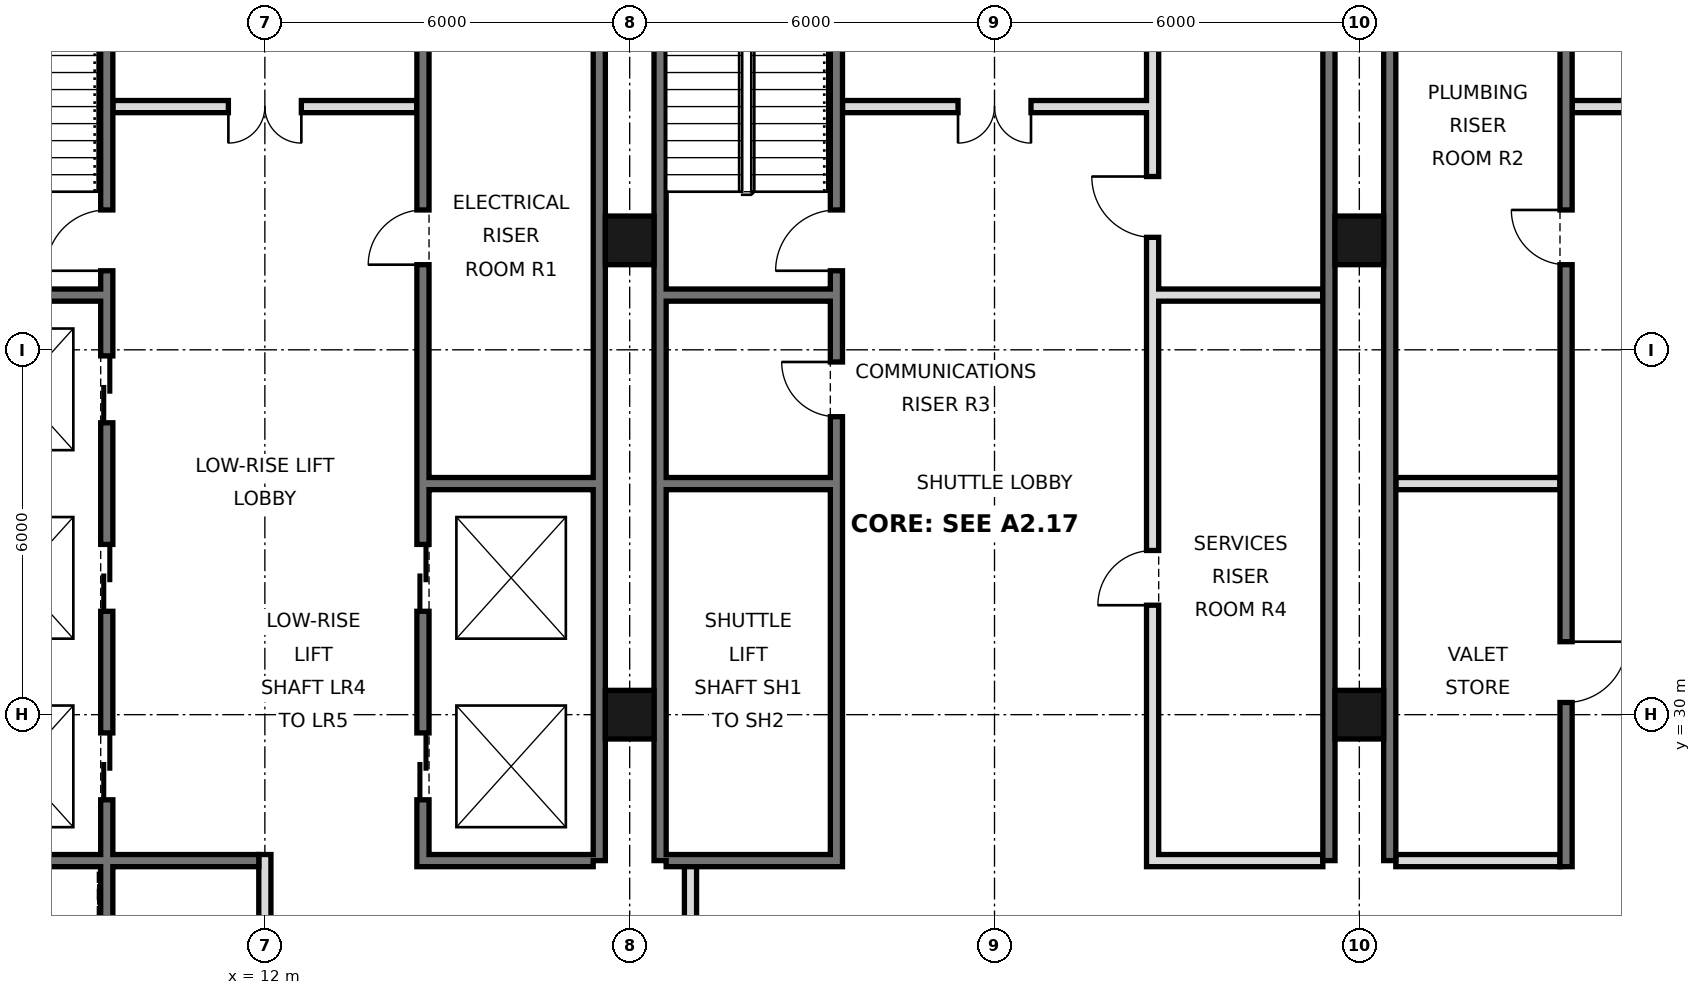
"""IFC4 building model, lengths in metres.
Left out: names, types, materials, properties, quantities, classifications, styles, units other than length and angle.
Written with IfcOpenShell. Run it as: python <this file> out.ifc"""

import sys

from ifc_helpers import new_model, si_unit, direction, frame, frame_2d, origin, origin_2d, place, context, subcontext, project, spatial, rectangle, hollow_rectangle, extrude, element, fill, save


model = new_model("IFC4")
c1 = context("Model", 3, precision=1e-05, world=origin(), true_north=direction((0.0, 1.0)))
c2 = subcontext(c1, "Body", "Model", "MODEL_VIEW")
j1 = project(units=[si_unit("LENGTHUNIT", "METRE"), si_unit("PLANEANGLEUNIT", "RADIAN")], contexts=[c1])
p1 = place(None, origin())
s1 = spatial("IfcSite", under=j1, at=p1, CompositionType="ELEMENT")
p2 = place(p1, origin())
s2 = spatial("IfcBuilding", under=s1, at=p2, CompositionType="ELEMENT")
p3 = place(p2, frame((0.0, 0.0, 67.8)))
s3 = spatial("IfcBuildingStorey", under=s2, at=p3, CompositionType="ELEMENT", Elevation=67.8)
for number, where, z_axis, x_axis in (
    (1, (18.0, 30.0, 0.0), (0.0, 0.0, 1.0), (1.0, 0.0, 0.0)),
    (2, (18.0, 37.8, 0.0), (0.0, 0.0, 1.0), (1.0, 0.0, 0.0)),
    (3, (30.0, 30.0, 0.0), (0.0, 0.0, 1.0), (1.0, 0.0, 0.0)),
    (4, (30.0, 37.8, 0.0), (0.0, 0.0, 1.0), (1.0, 0.0, 0.0)),
):
    element("IfcColumn", number, at=place(p3, frame(where, z_axis=z_axis, x_axis=x_axis)), inside=s3, PredefinedType="COLUMN", context=c2, shape_type="SweptSolid", body=[
        extrude(hollow_rectangle(XDim=0.8, YDim=0.8, WallThickness=0.06, at=origin_2d()), origin(), (0.0, 0.0, 1.0), 3.6),
    ])
for number, where, z_axis, x_axis in (
    (5, (17.5, 27.6, 0.0), (0.0, 0.0, 1.0), (0.0, 1.0, 0.0)),
    (6, (18.5, 27.6, 0.0), (0.0, 0.0, 1.0), (0.0, 1.0, 0.0)),
    (7, (29.5, 27.6, 0.0), (0.0, 0.0, 1.0), (0.0, 1.0, 0.0)),
    (8, (30.5, 27.6, 0.0), (0.0, 0.0, 1.0), (0.0, 1.0, 0.0)),
):
    element("IfcWall", number, at=place(p3, frame(where, z_axis=z_axis, x_axis=x_axis)), inside=s3, PredefinedType="SOLIDWALL", context=c2, shape_type="SweptSolid", body=[
        extrude(rectangle(XDim=17.5, YDim=0.2, at=frame_2d((8.75, 0.0))), origin(), (0.0, 0.0, 1.0), 3.42),
    ])
p4 = place(p3, frame((19.0, 21.6, 0.0), z_axis=(0.0, 0.0, 1.0), x_axis=(0.0, 1.0, 0.0)))
e9 = element("IfcWall", 9, at=p4, inside=s3, PredefinedType="PARTITIONING", context=c2, shape_type="SweptSolid", body=[
    extrude(rectangle(XDim=6.0, YDim=0.2, at=frame_2d((3.0, 0.0))), origin(), (0.0, 0.0, 1.0), 3.42),
])
p5 = place(p4, frame((2.1, 0.0, 0.0)))
e10 = element("IfcOpeningElement", 10, at=p5, cuts=e9, PredefinedType="OPENING", context=c2, shape_type="SweptSolid", body=[
    extrude(rectangle(XDim=1.8, YDim=2.1, at=frame_2d((0.9, 1.05))), frame((0.0, 0.11, 0.0), z_axis=(0.0, -1.0, 0.0), x_axis=(1.0, 0.0, 0.0)), (0.0, 0.0, 1.0), 0.22),
])
p6 = place(p3, frame((12.0, 21.6, 0.0), z_axis=(0.0, 0.0, 1.0), x_axis=(0.0, 1.0, 0.0)))
e11 = element("IfcWall", 11, at=p6, inside=s3, PredefinedType="PARTITIONING", context=c2, shape_type="SweptSolid", body=[
    extrude(rectangle(XDim=6.1, YDim=0.2, at=frame_2d((3.05, 0.0))), origin(), (0.0, 0.0, 1.0), 3.42),
])
p7 = place(p3, frame((14.6, 27.5, 0.0), z_axis=(0.0, 0.0, 1.0), x_axis=(0.0, 1.0, 0.0)))
e12 = element("IfcWall", 12, at=p7, inside=s3, PredefinedType="SOLIDWALL", context=c2, shape_type="SweptSolid", body=[
    extrude(rectangle(XDim=17.5, YDim=0.2, at=frame_2d((8.75, 0.0))), origin(), (0.0, 0.0, 1.0), 3.42),
])
p8 = place(p7, frame((1.1, 0.0, 0.0)))
e13 = element("IfcOpeningElement", 13, at=p8, cuts=e12, PredefinedType="OPENING", context=c2, shape_type="SweptSolid", body=[
    extrude(rectangle(XDim=1.1, YDim=2.1, at=frame_2d((0.55, 1.05))), frame((0.0, 0.11, 0.0), z_axis=(0.0, -1.0, 0.0), x_axis=(1.0, 0.0, 0.0)), (0.0, 0.0, 1.0), 0.22),
])
p9 = place(p7, frame((4.2, 0.0, 0.0)))
e14 = element("IfcOpeningElement", 14, at=p9, cuts=e12, PredefinedType="OPENING", context=c2, shape_type="SweptSolid", body=[
    extrude(rectangle(XDim=1.1, YDim=2.1, at=frame_2d((0.55, 1.05))), frame((0.0, 0.11, 0.0), z_axis=(0.0, -1.0, 0.0), x_axis=(1.0, 0.0, 0.0)), (0.0, 0.0, 1.0), 0.22),
])
p10 = place(p7, frame((15.4, 0.0, 0.0)))
e15 = element("IfcOpeningElement", 15, at=p10, cuts=e12, PredefinedType="OPENING", context=c2, shape_type="SweptSolid", body=[
    extrude(rectangle(XDim=1.1, YDim=2.1, at=frame_2d((0.55, 1.05))), frame((0.0, 0.11, 0.0), z_axis=(0.0, -1.0, 0.0), x_axis=(1.0, 0.0, 0.0)), (0.0, 0.0, 1.0), 0.22),
])
p11 = place(p7, frame((9.9, 0.0, 0.0)))
e16 = element("IfcOpeningElement", 16, at=p11, cuts=e12, PredefinedType="OPENING", context=c2, shape_type="SweptSolid", body=[
    extrude(rectangle(XDim=0.9, YDim=2.1, at=frame_2d((0.45, 1.05))), frame((0.0, 0.11, 0.0), z_axis=(0.0, -1.0, 0.0), x_axis=(1.0, 0.0, 0.0)), (0.0, 0.0, 1.0), 0.22),
])
p12 = place(p3, frame((21.4, 27.5, 0.0), z_axis=(0.0, 0.0, 1.0), x_axis=(0.0, 1.0, 0.0)))
e17 = element("IfcWall", 17, at=p12, inside=s3, PredefinedType="SOLIDWALL", context=c2, shape_type="SweptSolid", body=[
    extrude(rectangle(XDim=17.5, YDim=0.2, at=frame_2d((8.75, 0.0))), origin(), (0.0, 0.0, 1.0), 3.42),
])
p13 = place(p12, frame((9.8, 0.0, 0.0)))
e18 = element("IfcOpeningElement", 18, at=p13, cuts=e17, PredefinedType="OPENING", context=c2, shape_type="SweptSolid", body=[
    extrude(rectangle(XDim=1.0, YDim=2.1, at=frame_2d((0.5, 1.05))), frame((0.0, 0.11, 0.0), z_axis=(0.0, -1.0, 0.0), x_axis=(1.0, 0.0, 0.0)), (0.0, 0.0, 1.0), 0.22),
])
p14 = place(p12, frame((7.4, 0.0, 0.0)))
e19 = element("IfcOpeningElement", 19, at=p14, cuts=e17, PredefinedType="OPENING", context=c2, shape_type="SweptSolid", body=[
    extrude(rectangle(XDim=0.9, YDim=2.1, at=frame_2d((0.45, 1.05))), frame((0.0, 0.11, 0.0), z_axis=(0.0, -1.0, 0.0), x_axis=(1.0, 0.0, 0.0)), (0.0, 0.0, 1.0), 0.22),
])
p15 = place(p3, frame((26.6, 27.5, 0.0), z_axis=(0.0, 0.0, 1.0), x_axis=(0.0, 1.0, 0.0)))
e20 = element("IfcWall", 20, at=p15, inside=s3, PredefinedType="SOLIDWALL", context=c2, shape_type="SweptSolid", body=[
    extrude(rectangle(XDim=17.5, YDim=0.2, at=frame_2d((8.75, 0.0))), origin(), (0.0, 0.0, 1.0), 3.42),
])
p16 = place(p15, frame((4.3, 0.0, 0.0)))
e21 = element("IfcOpeningElement", 21, at=p16, cuts=e20, PredefinedType="OPENING", context=c2, shape_type="SweptSolid", body=[
    extrude(rectangle(XDim=0.9, YDim=2.1, at=frame_2d((0.45, 1.05))), frame((0.0, 0.11, 0.0), z_axis=(0.0, -1.0, 0.0), x_axis=(1.0, 0.0, 0.0)), (0.0, 0.0, 1.0), 0.22),
])
p17 = place(p15, frame((10.35, 0.0, 0.0)))
e22 = element("IfcOpeningElement", 22, at=p17, cuts=e20, PredefinedType="OPENING", context=c2, shape_type="SweptSolid", body=[
    extrude(rectangle(XDim=1.0, YDim=2.1, at=frame_2d((0.5, 1.05))), frame((0.0, 0.11, 0.0), z_axis=(0.0, -1.0, 0.0), x_axis=(1.0, 0.0, 0.0)), (0.0, 0.0, 1.0), 0.22),
])
p18 = place(p3, frame((33.4, 27.5, 0.0), z_axis=(0.0, 0.0, 1.0), x_axis=(0.0, 1.0, 0.0)))
e23 = element("IfcWall", 23, at=p18, inside=s3, PredefinedType="SOLIDWALL", context=c2, shape_type="SweptSolid", body=[
    extrude(rectangle(XDim=17.5, YDim=0.2, at=frame_2d((8.75, 0.0))), origin(), (0.0, 0.0, 1.0), 3.42),
])
p19 = place(p18, frame((15.4, 0.0, 0.0)))
e24 = element("IfcOpeningElement", 24, at=p19, cuts=e23, PredefinedType="OPENING", context=c2, shape_type="SweptSolid", body=[
    extrude(rectangle(XDim=1.1, YDim=2.1, at=frame_2d((0.55, 1.05))), frame((0.0, 0.11, 0.0), z_axis=(0.0, -1.0, 0.0), x_axis=(1.0, 0.0, 0.0)), (0.0, 0.0, 1.0), 0.22),
])
p20 = place(p18, frame((2.7, 0.0, 0.0)))
e25 = element("IfcOpeningElement", 25, at=p20, cuts=e23, PredefinedType="OPENING", context=c2, shape_type="SweptSolid", body=[
    extrude(rectangle(XDim=1.0, YDim=2.1, at=frame_2d((0.5, 1.05))), frame((0.0, 0.11, 0.0), z_axis=(0.0, -1.0, 0.0), x_axis=(1.0, 0.0, 0.0)), (0.0, 0.0, 1.0), 0.22),
])
p21 = place(p18, frame((9.9, 0.0, 0.0)))
e26 = element("IfcOpeningElement", 26, at=p21, cuts=e23, PredefinedType="OPENING", context=c2, shape_type="SweptSolid", body=[
    extrude(rectangle(XDim=0.9, YDim=2.1, at=frame_2d((0.45, 1.05))), frame((0.0, 0.11, 0.0), z_axis=(0.0, -1.0, 0.0), x_axis=(1.0, 0.0, 0.0)), (0.0, 0.0, 1.0), 0.22),
])
p22 = place(p3, frame((9.4, 21.6, 0.0), z_axis=(0.0, 0.0, 1.0), x_axis=(0.0, 1.0, 0.0)))
e27 = element("IfcWall", 27, at=p22, inside=s3, PredefinedType="SOLIDWALL", context=c2, shape_type="SweptSolid", body=[
    extrude(rectangle(XDim=23.4, YDim=0.2, at=frame_2d((11.7, 0.0))), origin(), (0.0, 0.0, 1.0), 3.42),
])
p23 = place(p22, frame((7.0, 0.0, 0.0)))
e28 = element("IfcOpeningElement", 28, at=p23, cuts=e27, PredefinedType="OPENING", context=c2, shape_type="SweptSolid", body=[
    extrude(rectangle(XDim=1.1, YDim=2.1, at=frame_2d((0.55, 1.05))), frame((0.0, 0.11, 0.0), z_axis=(0.0, -1.0, 0.0), x_axis=(1.0, 0.0, 0.0)), (0.0, 0.0, 1.0), 0.22),
])
p24 = place(p22, frame((10.1, 0.0, 0.0)))
e29 = element("IfcOpeningElement", 29, at=p24, cuts=e27, PredefinedType="OPENING", context=c2, shape_type="SweptSolid", body=[
    extrude(rectangle(XDim=1.1, YDim=2.1, at=frame_2d((0.55, 1.05))), frame((0.0, 0.11, 0.0), z_axis=(0.0, -1.0, 0.0), x_axis=(1.0, 0.0, 0.0)), (0.0, 0.0, 1.0), 0.22),
])
p25 = place(p22, frame((13.2, 0.0, 0.0)))
e30 = element("IfcOpeningElement", 30, at=p25, cuts=e27, PredefinedType="OPENING", context=c2, shape_type="SweptSolid", body=[
    extrude(rectangle(XDim=1.1, YDim=2.1, at=frame_2d((0.55, 1.05))), frame((0.0, 0.11, 0.0), z_axis=(0.0, -1.0, 0.0), x_axis=(1.0, 0.0, 0.0)), (0.0, 0.0, 1.0), 0.22),
])
p26 = place(p22, frame((15.7, 0.0, 0.0)))
e31 = element("IfcOpeningElement", 31, at=p26, cuts=e27, PredefinedType="OPENING", context=c2, shape_type="SweptSolid", body=[
    extrude(rectangle(XDim=1.0, YDim=2.1, at=frame_2d((0.5, 1.05))), frame((0.0, 0.11, 0.0), z_axis=(0.0, -1.0, 0.0), x_axis=(1.0, 0.0, 0.0)), (0.0, 0.0, 1.0), 0.22),
])
p27 = place(p22, frame((0.175, 0.0, 0.0)))
e32 = element("IfcOpeningElement", 32, at=p27, cuts=e27, PredefinedType="OPENING", context=c2, shape_type="SweptSolid", body=[
    extrude(rectangle(XDim=0.9, YDim=2.1, at=frame_2d((0.45, 1.05))), frame((0.0, 0.11, 0.0), z_axis=(0.0, -1.0, 0.0), x_axis=(1.0, 0.0, 0.0)), (0.0, 0.0, 1.0), 0.22),
])
for number, where, z_axis, x_axis in (
    (33, (14.7, 27.6, 0.0), (0.0, 0.0, 1.0), (1.0, 0.0, 0.0)),
    (34, (18.6, 27.6, 0.0), (0.0, 0.0, 1.0), (1.0, 0.0, 0.0)),
    (35, (26.7, 27.6, 0.0), (0.0, 0.0, 1.0), (1.0, 0.0, 0.0)),
):
    element("IfcWall", number, at=place(p3, frame(where, z_axis=z_axis, x_axis=x_axis)), inside=s3, PredefinedType="SOLIDWALL", context=c2, shape_type="SweptSolid", body=[
        extrude(rectangle(XDim=2.7, YDim=0.2, at=frame_2d((1.35, 0.0))), origin(), (0.0, 0.0, 1.0), 3.42),
    ])
p28 = place(p3, frame((30.6, 27.6, 0.0), z_axis=(0.0, 0.0, 1.0), x_axis=(1.0, 0.0, 0.0)))
e36 = element("IfcWall", 36, at=p28, inside=s3, PredefinedType="PARTITIONING", context=c2, shape_type="SweptSolid", body=[
    extrude(rectangle(XDim=2.7, YDim=0.2, at=frame_2d((1.35, 0.0))), origin(), (0.0, 0.0, 1.0), 3.42),
])
p29 = place(p3, frame((6.6, 27.6, 0.0), z_axis=(0.0, 0.0, 1.0), x_axis=(1.0, 0.0, 0.0)))
e37 = element("IfcWall", 37, at=p29, inside=s3, PredefinedType="SOLIDWALL", context=c2, shape_type="SweptSolid", body=[
    extrude(rectangle(XDim=5.3, YDim=0.2, at=frame_2d((2.65, 0.0))), origin(), (0.0, 0.0, 1.0), 3.42),
])
for number, where, z_axis, x_axis in (
    (38, (14.7, 33.8, 0.0), (0.0, 0.0, 1.0), (1.0, 0.0, 0.0)),
    (39, (18.6, 33.8, 0.0), (0.0, 0.0, 1.0), (1.0, 0.0, 0.0)),
    (40, (30.6, 33.8, 0.0), (0.0, 0.0, 1.0), (1.0, 0.0, 0.0)),
    (41, (18.6, 36.9, 0.0), (0.0, 0.0, 1.0), (1.0, 0.0, 0.0)),
    (42, (26.7, 36.9, 0.0), (0.0, 0.0, 1.0), (1.0, 0.0, 0.0)),
    (43, (6.6, 36.9, 0.0), (0.0, 0.0, 1.0), (1.0, 0.0, 0.0)),
):
    element("IfcWall", number, at=place(p3, frame(where, z_axis=z_axis, x_axis=x_axis)), inside=s3, PredefinedType="SOLIDWALL", context=c2, shape_type="SweptSolid", body=[
        extrude(rectangle(XDim=2.7, YDim=0.2, at=frame_2d((1.35, 0.0))), origin(), (0.0, 0.0, 1.0), 3.42),
    ])
p30 = place(p3, frame((21.5, 40.0, 0.0), z_axis=(0.0, 0.0, 1.0), x_axis=(1.0, 0.0, 0.0)))
e44 = element("IfcWall", 44, at=p30, inside=s3, PredefinedType="PARTITIONING", context=c2, shape_type="SweptSolid", body=[
    extrude(rectangle(XDim=5.0, YDim=0.2, at=frame_2d((2.5, 0.0))), origin(), (0.0, 0.0, 1.0), 3.42),
])
p31 = place(p30, frame((1.9, 0.0, 0.0)))
e45 = element("IfcOpeningElement", 45, at=p31, cuts=e44, PredefinedType="OPENING", context=c2, shape_type="SweptSolid", body=[
    extrude(rectangle(XDim=1.2, YDim=2.1, at=frame_2d((0.6, 1.05))), frame((0.0, 0.11, 0.0), z_axis=(0.0, -1.0, 0.0), x_axis=(1.0, 0.0, 0.0)), (0.0, 0.0, 1.0), 0.22),
])
p32 = place(p3, frame((33.5, 40.0, 0.0), z_axis=(0.0, 0.0, 1.0), x_axis=(1.0, 0.0, 0.0)))
e46 = element("IfcWall", 46, at=p32, inside=s3, PredefinedType="PARTITIONING", context=c2, shape_type="SweptSolid", body=[
    extrude(rectangle(XDim=5.0, YDim=0.2, at=frame_2d((2.5, 0.0))), origin(), (0.0, 0.0, 1.0), 3.42),
])
p33 = place(p32, frame((1.9, 0.0, 0.0)))
e47 = element("IfcOpeningElement", 47, at=p33, cuts=e46, PredefinedType="OPENING", context=c2, shape_type="SweptSolid", body=[
    extrude(rectangle(XDim=1.2, YDim=2.1, at=frame_2d((0.6, 1.05))), frame((0.0, 0.11, 0.0), z_axis=(0.0, -1.0, 0.0), x_axis=(1.0, 0.0, 0.0)), (0.0, 0.0, 1.0), 0.22),
])
p34 = place(p3, frame((9.5, 40.0, 0.0), z_axis=(0.0, 0.0, 1.0), x_axis=(1.0, 0.0, 0.0)))
e48 = element("IfcWall", 48, at=p34, inside=s3, PredefinedType="PARTITIONING", context=c2, shape_type="SweptSolid", body=[
    extrude(rectangle(XDim=5.0, YDim=0.2, at=frame_2d((2.5, 0.0))), origin(), (0.0, 0.0, 1.0), 3.42),
])
p35 = place(p34, frame((1.9, 0.0, 0.0)))
e49 = element("IfcOpeningElement", 49, at=p35, cuts=e48, PredefinedType="OPENING", context=c2, shape_type="SweptSolid", body=[
    extrude(rectangle(XDim=1.2, YDim=2.1, at=frame_2d((0.6, 1.05))), frame((0.0, 0.11, 0.0), z_axis=(0.0, -1.0, 0.0), x_axis=(1.0, 0.0, 0.0)), (0.0, 0.0, 1.0), 0.22),
])
p36 = place(p35, frame((1.2, 0.0, 0.0), z_axis=(0.0, 0.0, 1.0), x_axis=(-1.0, 0.0, 0.0)))
e50 = element("IfcDoor", 50, at=p36, inside=s3, OperationType="DOUBLE_DOOR_SINGLE_SWING", PredefinedType="DOOR", context=c2, shape_type="SweptSolid", body=[
    extrude(rectangle(XDim=1.2, YDim=2.1, at=frame_2d((0.6, 1.05))), frame((0.0, 0.025, 0.0), z_axis=(0.0, -1.0, 0.0), x_axis=(1.0, 0.0, 0.0)), (0.0, 0.0, 1.0), 0.05),
])
fill(e49, e50)
p37 = place(p31, frame((1.2, 0.0, 0.0), z_axis=(0.0, 0.0, 1.0), x_axis=(-1.0, 0.0, 0.0)))
e51 = element("IfcDoor", 51, at=p37, inside=s3, OperationType="DOUBLE_DOOR_SINGLE_SWING", PredefinedType="DOOR", context=c2, shape_type="SweptSolid", body=[
    extrude(rectangle(XDim=1.2, YDim=2.1, at=frame_2d((0.6, 1.05))), frame((0.0, 0.025, 0.0), z_axis=(0.0, -1.0, 0.0), x_axis=(1.0, 0.0, 0.0)), (0.0, 0.0, 1.0), 0.05),
])
fill(e45, e51)
p38 = place(p8, origin())
e52 = element("IfcDoor", 52, at=p38, inside=s3, OperationType="DOUBLE_DOOR_SLIDING", PredefinedType="DOOR", context=c2, shape_type="SweptSolid", body=[
    extrude(rectangle(XDim=1.1, YDim=2.1, at=frame_2d((0.55, 1.05))), frame((0.0, 0.025, 0.0), z_axis=(0.0, -1.0, 0.0), x_axis=(1.0, 0.0, 0.0)), (0.0, 0.0, 1.0), 0.05),
])
fill(e13, e52)
p39 = place(p9, origin())
e53 = element("IfcDoor", 53, at=p39, inside=s3, OperationType="DOUBLE_DOOR_SLIDING", PredefinedType="DOOR", context=c2, shape_type="SweptSolid", body=[
    extrude(rectangle(XDim=1.1, YDim=2.1, at=frame_2d((0.55, 1.05))), frame((0.0, 0.025, 0.0), z_axis=(0.0, -1.0, 0.0), x_axis=(1.0, 0.0, 0.0)), (0.0, 0.0, 1.0), 0.05),
])
fill(e14, e53)
p40 = place(p23, origin())
e54 = element("IfcDoor", 54, at=p40, inside=s3, OperationType="DOUBLE_DOOR_SLIDING", PredefinedType="DOOR", context=c2, shape_type="SweptSolid", body=[
    extrude(rectangle(XDim=1.1, YDim=2.1, at=frame_2d((0.55, 1.05))), frame((0.0, 0.025, 0.0), z_axis=(0.0, -1.0, 0.0), x_axis=(1.0, 0.0, 0.0)), (0.0, 0.0, 1.0), 0.05),
])
fill(e28, e54)
p41 = place(p24, origin())
e55 = element("IfcDoor", 55, at=p41, inside=s3, OperationType="DOUBLE_DOOR_SLIDING", PredefinedType="DOOR", context=c2, shape_type="SweptSolid", body=[
    extrude(rectangle(XDim=1.1, YDim=2.1, at=frame_2d((0.55, 1.05))), frame((0.0, 0.025, 0.0), z_axis=(0.0, -1.0, 0.0), x_axis=(1.0, 0.0, 0.0)), (0.0, 0.0, 1.0), 0.05),
])
fill(e29, e55)
p42 = place(p25, origin())
e56 = element("IfcDoor", 56, at=p42, inside=s3, OperationType="DOUBLE_DOOR_SLIDING", PredefinedType="DOOR", context=c2, shape_type="SweptSolid", body=[
    extrude(rectangle(XDim=1.1, YDim=2.1, at=frame_2d((0.55, 1.05))), frame((0.0, 0.025, 0.0), z_axis=(0.0, -1.0, 0.0), x_axis=(1.0, 0.0, 0.0)), (0.0, 0.0, 1.0), 0.05),
])
fill(e30, e56)
p43 = place(p20, origin())
e57 = element("IfcDoor", 57, at=p43, inside=s3, OperationType="SINGLE_SWING_RIGHT", PredefinedType="DOOR", context=c2, shape_type="SweptSolid", body=[
    extrude(rectangle(XDim=1.0, YDim=2.1, at=frame_2d((0.5, 1.05))), frame((0.0, 0.025, 0.0), z_axis=(0.0, -1.0, 0.0), x_axis=(1.0, 0.0, 0.0)), (0.0, 0.0, 1.0), 0.05),
])
fill(e25, e57)
p44 = place(p26, origin())
e58 = element("IfcDoor", 58, at=p44, inside=s3, OperationType="SINGLE_SWING_LEFT", PredefinedType="DOOR", context=c2, shape_type="SweptSolid", body=[
    extrude(rectangle(XDim=1.0, YDim=2.1, at=frame_2d((0.5, 1.05))), frame((0.0, 0.025, 0.0), z_axis=(0.0, -1.0, 0.0), x_axis=(1.0, 0.0, 0.0)), (0.0, 0.0, 1.0), 0.05),
])
fill(e31, e58)
p45 = place(p13, origin())
e59 = element("IfcDoor", 59, at=p45, inside=s3, OperationType="SINGLE_SWING_LEFT", PredefinedType="DOOR", context=c2, shape_type="SweptSolid", body=[
    extrude(rectangle(XDim=1.0, YDim=2.1, at=frame_2d((0.5, 1.05))), frame((0.0, 0.025, 0.0), z_axis=(0.0, -1.0, 0.0), x_axis=(1.0, 0.0, 0.0)), (0.0, 0.0, 1.0), 0.05),
])
fill(e18, e59)
p46 = place(p11, origin())
e60 = element("IfcDoor", 60, at=p46, inside=s3, OperationType="SINGLE_SWING_LEFT", PredefinedType="DOOR", context=c2, shape_type="SweptSolid", body=[
    extrude(rectangle(XDim=0.9, YDim=2.1, at=frame_2d((0.45, 1.05))), frame((0.0, 0.025, 0.0), z_axis=(0.0, -1.0, 0.0), x_axis=(1.0, 0.0, 0.0)), (0.0, 0.0, 1.0), 0.05),
])
fill(e16, e60)
p47 = place(p21, frame((0.9, 0.0, 0.0), z_axis=(0.0, 0.0, 1.0), x_axis=(-1.0, 0.0, 0.0)))
e61 = element("IfcDoor", 61, at=p47, inside=s3, OperationType="SINGLE_SWING_LEFT", PredefinedType="DOOR", context=c2, shape_type="SweptSolid", body=[
    extrude(rectangle(XDim=0.9, YDim=2.1, at=frame_2d((0.45, 1.05))), frame((0.0, 0.025, 0.0), z_axis=(0.0, -1.0, 0.0), x_axis=(1.0, 0.0, 0.0)), (0.0, 0.0, 1.0), 0.05),
])
fill(e26, e61)
p48 = place(p14, frame((0.9, 0.0, 0.0), z_axis=(0.0, 0.0, 1.0), x_axis=(-1.0, 0.0, 0.0)))
e62 = element("IfcDoor", 62, at=p48, inside=s3, OperationType="SINGLE_SWING_LEFT", PredefinedType="DOOR", context=c2, shape_type="SweptSolid", body=[
    extrude(rectangle(XDim=0.9, YDim=2.1, at=frame_2d((0.45, 1.05))), frame((0.0, 0.025, 0.0), z_axis=(0.0, -1.0, 0.0), x_axis=(1.0, 0.0, 0.0)), (0.0, 0.0, 1.0), 0.05),
])
fill(e19, e62)
p49 = place(p16, origin())
e63 = element("IfcDoor", 63, at=p49, inside=s3, OperationType="SINGLE_SWING_LEFT", PredefinedType="DOOR", context=c2, shape_type="SweptSolid", body=[
    extrude(rectangle(XDim=0.9, YDim=2.1, at=frame_2d((0.45, 1.05))), frame((0.0, 0.025, 0.0), z_axis=(0.0, -1.0, 0.0), x_axis=(1.0, 0.0, 0.0)), (0.0, 0.0, 1.0), 0.05),
])
fill(e21, e63)
p50 = place(p17, frame((1.0, 0.0, 0.0), z_axis=(0.0, 0.0, 1.0), x_axis=(-1.0, 0.0, 0.0)))
e64 = element("IfcDoor", 64, at=p50, inside=s3, OperationType="SINGLE_SWING_LEFT", PredefinedType="DOOR", context=c2, shape_type="SweptSolid", body=[
    extrude(rectangle(XDim=1.0, YDim=2.1, at=frame_2d((0.5, 1.05))), frame((0.0, 0.025, 0.0), z_axis=(0.0, -1.0, 0.0), x_axis=(1.0, 0.0, 0.0)), (0.0, 0.0, 1.0), 0.05),
])
fill(e22, e64)
save(model, sys.argv[1])
